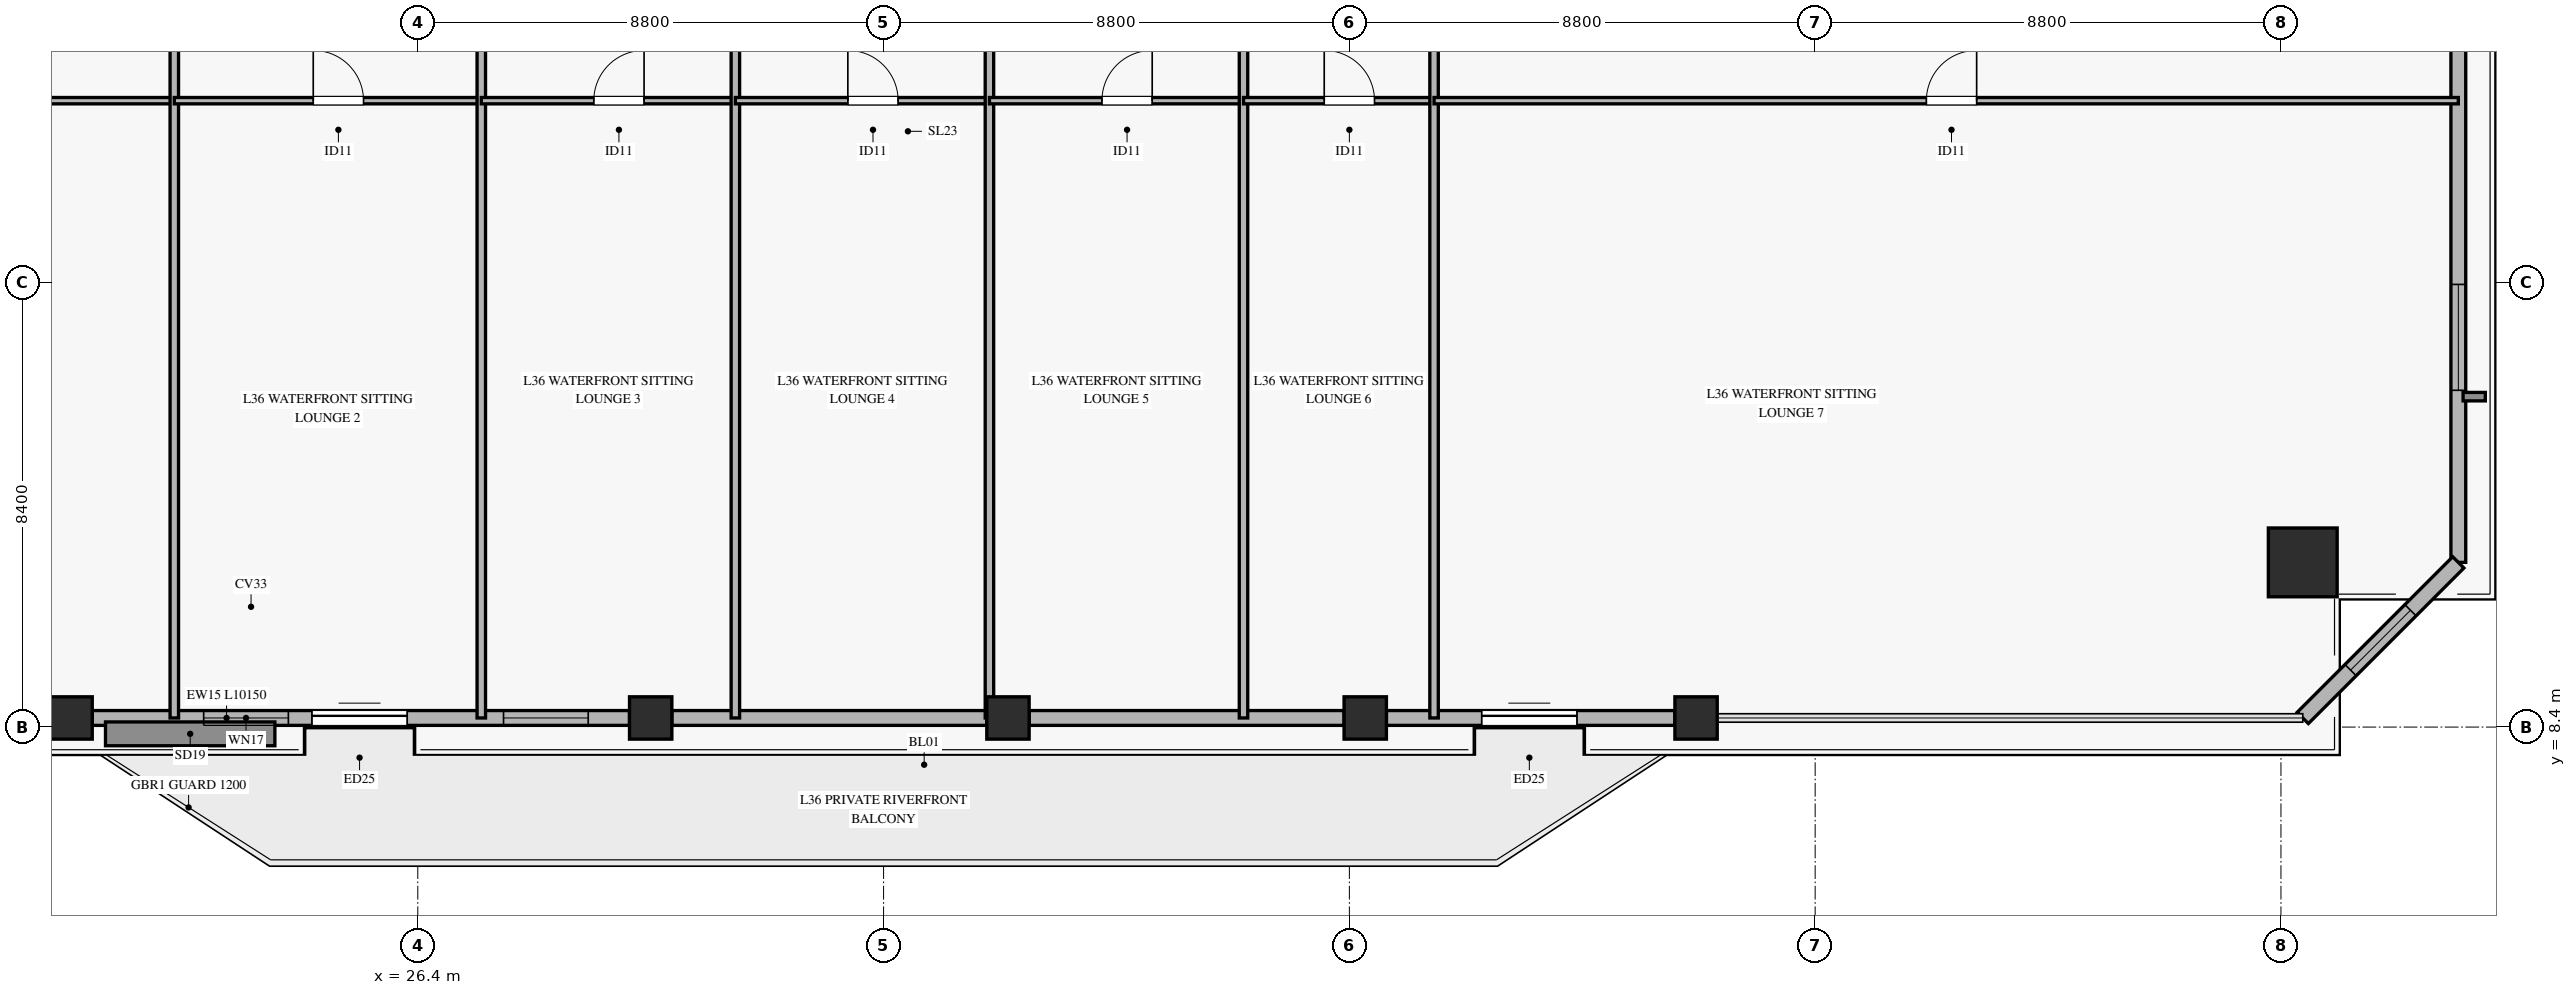
"""IFC4 building model, lengths in metres.
Left out: names, types, materials, properties, quantities, classifications, styles, units other than length and angle.
Written with IfcOpenShell. Run it as: python <this file> out.ifc"""

import sys

from ifc_helpers import new_model, si_unit, direction, frame, frame_2d, origin, origin_2d, place, context, subcontext, project, spatial, rectangle, hollow_rectangle, extrude, source, transform, mapped, element, fill, save


model = new_model("IFC4")
c1 = context("Model", 3, precision=1e-05, world=origin(), true_north=direction((0.0, 1.0)))
c2 = subcontext(c1, "Body", "Model", "MODEL_VIEW")
j1 = project(units=[si_unit("LENGTHUNIT", "METRE"), si_unit("PLANEANGLEUNIT", "RADIAN")], contexts=[c1])
p1 = place(None, origin())
s1 = spatial("IfcSite", under=j1, at=p1, CompositionType="ELEMENT")
p2 = place(p1, origin())
s2 = spatial("IfcBuilding", under=s1, at=p2, CompositionType="ELEMENT")
p3 = place(p2, frame((0.0, 0.0, 149.2)))
s3 = spatial("IfcBuildingStorey", under=s2, at=p3, CompositionType="ELEMENT", Elevation=149.2)
m1 = source(origin(), c2, "Body", "SweptSolid", [
    extrude(hollow_rectangle(XDim=1.3, YDim=1.3, WallThickness=0.06, at=origin_2d()), origin(), (0.0, 0.0, 1.0), 3.27),
])
p4 = place(p3, frame((62.012, 11.511, 0.0), z_axis=(0.0, 0.0, 1.0), x_axis=(1.0, 0.0, 0.0)))
e1 = element("IfcColumn", 1, at=p4, inside=s3, PredefinedType="COLUMN", context=c2, shape_type="MappedRepresentation", body=[
    mapped(m1, transform((0.0, 0.0, 0.0), x_axis=(1.0, 0.0, 0.0), y_axis=(0.0, 1.0, 0.0), z_axis=(0.0, 0.0, 1.0), scale=1.0)),
])
m2 = source(origin(), c2, "Body", "SweptSolid", [
    extrude(hollow_rectangle(XDim=0.8, YDim=0.8, WallThickness=0.036, at=origin_2d()), origin(), (0.0, 0.0, 1.0), 3.27),
])
for number, where, z_axis, x_axis in (
    (2, (19.85, 8.572, 0.0), (0.0, 0.0, 1.0), (1.0, 0.0, 0.0)),
    (3, (30.8, 8.572, 0.0), (0.0, 0.0, 1.0), (1.0, 0.0, 0.0)),
    (4, (37.55, 8.572, 0.0), (0.0, 0.0, 1.0), (1.0, 0.0, 0.0)),
    (5, (44.3, 8.572, 0.0), (0.0, 0.0, 1.0), (1.0, 0.0, 0.0)),
    (6, (50.55, 8.572, 0.0), (0.0, 0.0, 1.0), (1.0, 0.0, 0.0)),
):
    element("IfcColumn", number, at=place(p3, frame(where, z_axis=z_axis, x_axis=x_axis)), inside=s3, PredefinedType="COLUMN", context=c2, shape_type="MappedRepresentation", body=[
        mapped(m2, transform((0.0, 0.0, 0.0), x_axis=(1.0, 0.0, 0.0), y_axis=(0.0, 1.0, 0.0), z_axis=(0.0, 0.0, 1.0), scale=1.0)),
    ])
p5 = place(p3, frame((20.25, 8.572, 0.0), z_axis=(0.0, 0.0, 1.0), x_axis=(1.0, 0.0, 0.0)))
e7 = element("IfcWall", 7, at=p5, inside=s3, PredefinedType="SOLIDWALL", context=c2, shape_type="SweptSolid", body=[
    extrude(rectangle(XDim=10.15, YDim=0.28, at=frame_2d((5.075, 0.0))), origin(), (0.0, 0.0, 1.0), 2.75),
])
p6 = place(p5, frame((4.15, 0.0, 0.0)))
e8 = element("IfcOpeningElement", 8, at=p6, cuts=e7, PredefinedType="OPENING", context=c2, shape_type="SweptSolid", body=[
    extrude(rectangle(XDim=1.8, YDim=2.25, at=frame_2d((0.9, 1.125))), frame((0.0, 0.15, 0.0), z_axis=(0.0, -1.0, 0.0), x_axis=(1.0, 0.0, 0.0)), (0.0, 0.0, 1.0), 0.3),
])
p7 = place(p5, frame((2.105, 0.0, 0.45)))
e9 = element("IfcOpeningElement", 9, at=p7, cuts=e7, PredefinedType="OPENING", context=c2, shape_type="SweptSolid", body=[
    extrude(rectangle(XDim=1.6, YDim=2.0, at=frame_2d((0.8, 1.0))), frame((0.0, 0.15, 0.0), z_axis=(0.0, -1.0, 0.0), x_axis=(1.0, 0.0, 0.0)), (0.0, 0.0, 1.0), 0.3),
])
p8 = place(p5, frame((7.77, 0.0, 0.45)))
e10 = element("IfcOpeningElement", 10, at=p8, cuts=e7, PredefinedType="OPENING", context=c2, shape_type="SweptSolid", body=[
    extrude(rectangle(XDim=1.6, YDim=2.0, at=frame_2d((0.8, 1.0))), frame((0.0, 0.15, 0.0), z_axis=(0.0, -1.0, 0.0), x_axis=(1.0, 0.0, 0.0)), (0.0, 0.0, 1.0), 0.3),
])
for number, where, z_axis, x_axis in (
    (11, (31.2, 8.572, 0.0), (0.0, 0.0, 1.0), (1.0, 0.0, 0.0)),
    (12, (37.95, 8.572, 0.0), (0.0, 0.0, 1.0), (1.0, 0.0, 0.0)),
):
    element("IfcWall", number, at=place(p3, frame(where, z_axis=z_axis, x_axis=x_axis)), inside=s3, PredefinedType="SOLIDWALL", context=c2, shape_type="SweptSolid", body=[
        extrude(rectangle(XDim=5.95, YDim=0.28, at=frame_2d((2.975, 0.0))), origin(), (0.0, 0.0, 1.0), 2.75),
    ])
p9 = place(p3, frame((44.7, 8.572, 0.0), z_axis=(0.0, 0.0, 1.0), x_axis=(1.0, 0.0, 0.0)))
e13 = element("IfcWall", 13, at=p9, inside=s3, PredefinedType="SOLIDWALL", context=c2, shape_type="SweptSolid", body=[
    extrude(rectangle(XDim=5.45, YDim=0.28, at=frame_2d((2.725, 0.0))), origin(), (0.0, 0.0, 1.0), 2.75),
])
p10 = place(p9, frame((1.8, 0.0, 0.0)))
e14 = element("IfcOpeningElement", 14, at=p10, cuts=e13, PredefinedType="OPENING", context=c2, shape_type="SweptSolid", body=[
    extrude(rectangle(XDim=1.8, YDim=2.25, at=frame_2d((0.9, 1.125))), frame((0.0, 0.15, 0.0), z_axis=(0.0, -1.0, 0.0), x_axis=(1.0, 0.0, 0.0)), (0.0, 0.0, 1.0), 0.3),
])
p11 = place(p3, frame((64.951, 11.511, 0.0), z_axis=(0.0, 0.0, 1.0), x_axis=(0.0, 1.0, 0.0)))
e15 = element("IfcWall", 15, at=p11, inside=s3, PredefinedType="SOLIDWALL", context=c2, shape_type="SweptSolid", body=[
    extrude(rectangle(XDim=15.425, YDim=0.28, at=frame_2d((7.712, 0.0))), origin(), (0.0, 0.0, 1.0), 2.75),
])
p12 = place(p11, frame((3.251, 0.0, 0.45)))
e16 = element("IfcOpeningElement", 16, at=p12, cuts=e15, PredefinedType="OPENING", context=c2, shape_type="SweptSolid", body=[
    extrude(rectangle(XDim=2.0, YDim=2.0, at=frame_2d((1.0, 1.0))), frame((0.0, 0.15, 0.0), z_axis=(0.0, -1.0, 0.0), x_axis=(1.0, 0.0, 0.0)), (0.0, 0.0, 1.0), 0.3),
])
p13 = place(p11, frame((10.463, 0.0, 0.45)))
e17 = element("IfcOpeningElement", 17, at=p13, cuts=e15, PredefinedType="OPENING", context=c2, shape_type="SweptSolid", body=[
    extrude(rectangle(XDim=2.0, YDim=2.0, at=frame_2d((1.0, 1.0))), frame((0.0, 0.15, 0.0), z_axis=(0.0, -1.0, 0.0), x_axis=(1.0, 0.0, 0.0)), (0.0, 0.0, 1.0), 0.3),
])
p14 = place(p3, frame((62.012, 8.572, 0.0), z_axis=(0.0, 0.0, 1.0), x_axis=(0.707106781187, 0.707106781187, 0.0)))
e18 = element("IfcWall", 18, at=p14, inside=s3, PredefinedType="SOLIDWALL", context=c2, shape_type="SweptSolid", body=[
    extrude(rectangle(XDim=4.156, YDim=0.3, at=frame_2d((2.078, 0.0))), origin(), (0.0, 0.0, 1.0), 2.75),
])
p15 = place(p14, frame((1.278, 0.0, 0.45)))
e19 = element("IfcOpeningElement", 19, at=p15, cuts=e18, PredefinedType="OPENING", context=c2, shape_type="SweptSolid", body=[
    extrude(rectangle(XDim=1.6, YDim=2.0, at=frame_2d((0.8, 1.0))), frame((0.0, 0.16, 0.0), z_axis=(0.0, -1.0, 0.0), x_axis=(1.0, 0.0, 0.0)), (0.0, 0.0, 1.0), 0.32),
])
p16 = place(p3, frame((5.449, 20.233, 0.0), z_axis=(0.0, 0.0, 1.0), x_axis=(1.0, 0.0, 0.0)))
e20 = element("IfcWall", 20, at=p16, inside=s3, PredefinedType="PARTITIONING", context=c2, shape_type="SweptSolid", body=[
    extrude(rectangle(XDim=16.351, YDim=0.12, at=frame_2d((8.176, 0.0))), origin(), (0.0, 0.0, 1.0), 2.455),
])
p17 = place(p16, frame((8.001, 0.0, 0.0)))
e21 = element("IfcOpeningElement", 21, at=p17, cuts=e20, PredefinedType="OPENING", context=c2, shape_type="SweptSolid", body=[
    extrude(rectangle(XDim=0.95, YDim=2.1, at=frame_2d((0.475, 1.05))), frame((0.0, 0.07, 0.0), z_axis=(0.0, -1.0, 0.0), x_axis=(1.0, 0.0, 0.0)), (0.0, 0.0, 1.0), 0.14),
])
p18 = place(p3, frame((21.8, 8.572, 0.0), z_axis=(0.0, 0.0, 1.0), x_axis=(0.0, 1.0, 0.0)))
e22 = element("IfcWall", 22, at=p18, inside=s3, PredefinedType="PARTITIONING", context=c2, shape_type="SweptSolid", body=[
    extrude(rectangle(XDim=26.628, YDim=0.16, at=frame_2d((13.314, 0.0))), origin(), (0.0, 0.0, 1.0), 2.755),
])
p19 = place(p3, frame((21.8, 20.233, 0.0), z_axis=(0.0, 0.0, 1.0), x_axis=(1.0, 0.0, 0.0)))
e23 = element("IfcWall", 23, at=p19, inside=s3, PredefinedType="PARTITIONING", context=c2, shape_type="SweptSolid", body=[
    extrude(rectangle(XDim=5.8, YDim=0.12, at=frame_2d((2.9, 0.0))), origin(), (0.0, 0.0, 1.0), 3.27),
])
p20 = place(p19, frame((2.625, 0.0, 0.0)))
e24 = element("IfcOpeningElement", 24, at=p20, cuts=e23, PredefinedType="OPENING", context=c2, shape_type="SweptSolid", body=[
    extrude(rectangle(XDim=0.95, YDim=2.1, at=frame_2d((0.475, 1.05))), frame((0.0, 0.07, 0.0), z_axis=(0.0, -1.0, 0.0), x_axis=(1.0, 0.0, 0.0)), (0.0, 0.0, 1.0), 0.14),
])
p21 = place(p3, frame((27.6, 8.572, 0.0), z_axis=(0.0, 0.0, 1.0), x_axis=(0.0, 1.0, 0.0)))
e25 = element("IfcWall", 25, at=p21, inside=s3, PredefinedType="PARTITIONING", context=c2, shape_type="SweptSolid", body=[
    extrude(rectangle(XDim=26.628, YDim=0.16, at=frame_2d((13.314, 0.0))), origin(), (0.0, 0.0, 1.0), 2.755),
])
p22 = place(p3, frame((27.6, 20.233, 0.0), z_axis=(0.0, 0.0, 1.0), x_axis=(1.0, 0.0, 0.0)))
e26 = element("IfcWall", 26, at=p22, inside=s3, PredefinedType="PARTITIONING", context=c2, shape_type="SweptSolid", body=[
    extrude(rectangle(XDim=4.8, YDim=0.12, at=frame_2d((2.4, 0.0))), origin(), (0.0, 0.0, 1.0), 2.455),
])
p23 = place(p22, frame((2.125, 0.0, 0.0)))
e27 = element("IfcOpeningElement", 27, at=p23, cuts=e26, PredefinedType="OPENING", context=c2, shape_type="SweptSolid", body=[
    extrude(rectangle(XDim=0.95, YDim=2.1, at=frame_2d((0.475, 1.05))), frame((0.0, 0.07, 0.0), z_axis=(0.0, -1.0, 0.0), x_axis=(1.0, 0.0, 0.0)), (0.0, 0.0, 1.0), 0.14),
])
p24 = place(p3, frame((32.4, 8.572, 0.0), z_axis=(0.0, 0.0, 1.0), x_axis=(0.0, 1.0, 0.0)))
e28 = element("IfcWall", 28, at=p24, inside=s3, PredefinedType="PARTITIONING", context=c2, shape_type="SweptSolid", body=[
    extrude(rectangle(XDim=26.628, YDim=0.16, at=frame_2d((13.314, 0.0))), origin(), (0.0, 0.0, 1.0), 2.755),
])
p25 = place(p3, frame((32.4, 20.233, 0.0), z_axis=(0.0, 0.0, 1.0), x_axis=(1.0, 0.0, 0.0)))
e29 = element("IfcWall", 29, at=p25, inside=s3, PredefinedType="PARTITIONING", context=c2, shape_type="SweptSolid", body=[
    extrude(rectangle(XDim=4.8, YDim=0.12, at=frame_2d((2.4, 0.0))), origin(), (0.0, 0.0, 1.0), 3.27),
])
p26 = place(p25, frame((2.125, 0.0, 0.0)))
e30 = element("IfcOpeningElement", 30, at=p26, cuts=e29, PredefinedType="OPENING", context=c2, shape_type="SweptSolid", body=[
    extrude(rectangle(XDim=0.95, YDim=2.1, at=frame_2d((0.475, 1.05))), frame((0.0, 0.07, 0.0), z_axis=(0.0, -1.0, 0.0), x_axis=(1.0, 0.0, 0.0)), (0.0, 0.0, 1.0), 0.14),
])
p27 = place(p3, frame((37.2, 8.572, 0.0), z_axis=(0.0, 0.0, 1.0), x_axis=(0.0, 1.0, 0.0)))
e31 = element("IfcWall", 31, at=p27, inside=s3, PredefinedType="PARTITIONING", context=c2, shape_type="SweptSolid", body=[
    extrude(rectangle(XDim=26.628, YDim=0.16, at=frame_2d((13.314, 0.0))), origin(), (0.0, 0.0, 1.0), 2.805),
])
p28 = place(p3, frame((37.2, 20.233, 0.0), z_axis=(0.0, 0.0, 1.0), x_axis=(1.0, 0.0, 0.0)))
e32 = element("IfcWall", 32, at=p28, inside=s3, PredefinedType="PARTITIONING", context=c2, shape_type="SweptSolid", body=[
    extrude(rectangle(XDim=4.8, YDim=0.12, at=frame_2d((2.4, 0.0))), origin(), (0.0, 0.0, 1.0), 2.455),
])
p29 = place(p28, frame((2.125, 0.0, 0.0)))
e33 = element("IfcOpeningElement", 33, at=p29, cuts=e32, PredefinedType="OPENING", context=c2, shape_type="SweptSolid", body=[
    extrude(rectangle(XDim=0.95, YDim=2.1, at=frame_2d((0.475, 1.05))), frame((0.0, 0.07, 0.0), z_axis=(0.0, -1.0, 0.0), x_axis=(1.0, 0.0, 0.0)), (0.0, 0.0, 1.0), 0.14),
])
p30 = place(p3, frame((42.0, 8.572, 0.0), z_axis=(0.0, 0.0, 1.0), x_axis=(0.0, 1.0, 0.0)))
e34 = element("IfcWall", 34, at=p30, inside=s3, PredefinedType="PARTITIONING", context=c2, shape_type="SweptSolid", body=[
    extrude(rectangle(XDim=26.628, YDim=0.16, at=frame_2d((13.314, 0.0))), origin(), (0.0, 0.0, 1.0), 2.755),
])
p31 = place(p3, frame((42.0, 20.233, 0.0), z_axis=(0.0, 0.0, 1.0), x_axis=(1.0, 0.0, 0.0)))
e35 = element("IfcWall", 35, at=p31, inside=s3, PredefinedType="PARTITIONING", context=c2, shape_type="SweptSolid", body=[
    extrude(rectangle(XDim=3.6, YDim=0.12, at=frame_2d((1.8, 0.0))), origin(), (0.0, 0.0, 1.0), 2.455),
])
p32 = place(p31, frame((1.525, 0.0, 0.0)))
e36 = element("IfcOpeningElement", 36, at=p32, cuts=e35, PredefinedType="OPENING", context=c2, shape_type="SweptSolid", body=[
    extrude(rectangle(XDim=0.95, YDim=2.1, at=frame_2d((0.475, 1.05))), frame((0.0, 0.07, 0.0), z_axis=(0.0, -1.0, 0.0), x_axis=(1.0, 0.0, 0.0)), (0.0, 0.0, 1.0), 0.14),
])
p33 = place(p3, frame((45.6, 8.572, 0.0), z_axis=(0.0, 0.0, 1.0), x_axis=(0.0, 1.0, 0.0)))
e37 = element("IfcWall", 37, at=p33, inside=s3, PredefinedType="PARTITIONING", context=c2, shape_type="SweptSolid", body=[
    extrude(rectangle(XDim=26.628, YDim=0.16, at=frame_2d((13.314, 0.0))), origin(), (0.0, 0.0, 1.0), 2.755),
])
p34 = place(p3, frame((45.6, 20.233, 0.0), z_axis=(0.0, 0.0, 1.0), x_axis=(1.0, 0.0, 0.0)))
e38 = element("IfcWall", 38, at=p34, inside=s3, PredefinedType="PARTITIONING", context=c2, shape_type="SweptSolid", body=[
    extrude(rectangle(XDim=19.351, YDim=0.12, at=frame_2d((9.675, 0.0))), origin(), (0.0, 0.0, 1.0), 2.455),
])
p35 = place(p34, frame((9.301, 0.0, 0.0)))
e39 = element("IfcOpeningElement", 39, at=p35, cuts=e38, PredefinedType="OPENING", context=c2, shape_type="SweptSolid", body=[
    extrude(rectangle(XDim=0.95, YDim=2.1, at=frame_2d((0.475, 1.05))), frame((0.0, 0.07, 0.0), z_axis=(0.0, -1.0, 0.0), x_axis=(1.0, 0.0, 0.0)), (0.0, 0.0, 1.0), 0.14),
])
m3 = source(origin(), c2, "Body", "SweptSolid", [
    extrude(rectangle(XDim=1.8, YDim=2.25, at=frame_2d((0.9, 1.125))), frame((0.0, 0.025, 0.0), z_axis=(0.0, -1.0, 0.0), x_axis=(1.0, 0.0, 0.0)), (0.0, 0.0, 1.0), 0.05),
])
p36 = place(p6, origin())
e40 = element("IfcDoor", 40, at=p36, inside=s3, OperationType="SLIDING_TO_LEFT", PredefinedType="DOOR", context=c2, shape_type="MappedRepresentation", body=[
    mapped(m3, transform((0.0, 0.0, 0.0), x_axis=(1.0, 0.0, 0.0), y_axis=(0.0, 1.0, 0.0), z_axis=(0.0, 0.0, 1.0), scale=1.0)),
])
fill(e8, e40)
m4 = source(origin(), c2, "Body", "SweptSolid", [
    extrude(rectangle(XDim=1.6, YDim=2.0, at=frame_2d((0.8, 1.0))), frame((0.0, 0.03, 0.0), z_axis=(0.0, -1.0, 0.0), x_axis=(1.0, 0.0, 0.0)), (0.0, 0.0, 1.0), 0.06),
])
p37 = place(p7, origin())
e41 = element("IfcWindow", 41, at=p37, inside=s3, PartitioningType="SINGLE_PANEL", PredefinedType="WINDOW", context=c2, shape_type="MappedRepresentation", body=[
    mapped(m4, transform((0.0, 0.0, 0.0), x_axis=(1.0, 0.0, 0.0), y_axis=(0.0, 1.0, 0.0), z_axis=(0.0, 0.0, 1.0), scale=1.0)),
])
fill(e9, e41)
p38 = place(p8, origin())
e42 = element("IfcWindow", 42, at=p38, inside=s3, PartitioningType="SINGLE_PANEL", PredefinedType="WINDOW", context=c2, shape_type="MappedRepresentation", body=[
    mapped(m4, transform((0.0, 0.0, 0.0), x_axis=(1.0, 0.0, 0.0), y_axis=(0.0, 1.0, 0.0), z_axis=(0.0, 0.0, 1.0), scale=1.0)),
])
fill(e10, e42)
p39 = place(p10, origin())
e43 = element("IfcDoor", 43, at=p39, inside=s3, OperationType="SLIDING_TO_LEFT", PredefinedType="DOOR", context=c2, shape_type="MappedRepresentation", body=[
    mapped(m3, transform((0.0, 0.0, 0.0), x_axis=(1.0, 0.0, 0.0), y_axis=(0.0, 1.0, 0.0), z_axis=(0.0, 0.0, 1.0), scale=1.0)),
])
fill(e14, e43)
m5 = source(origin(), c2, "Body", "SweptSolid", [
    extrude(rectangle(XDim=2.0, YDim=2.0, at=frame_2d((1.0, 1.0))), frame((0.0, 0.03, 0.0), z_axis=(0.0, -1.0, 0.0), x_axis=(1.0, 0.0, 0.0)), (0.0, 0.0, 1.0), 0.06),
])
p40 = place(p12, origin())
e44 = element("IfcWindow", 44, at=p40, inside=s3, PartitioningType="SINGLE_PANEL", PredefinedType="WINDOW", context=c2, shape_type="MappedRepresentation", body=[
    mapped(m5, transform((0.0, 0.0, 0.0), x_axis=(1.0, 0.0, 0.0), y_axis=(0.0, 1.0, 0.0), z_axis=(0.0, 0.0, 1.0), scale=1.0)),
])
fill(e16, e44)
p41 = place(p15, origin())
e45 = element("IfcWindow", 45, at=p41, inside=s3, PartitioningType="SINGLE_PANEL", PredefinedType="WINDOW", context=c2, shape_type="MappedRepresentation", body=[
    mapped(m4, transform((0.0, 0.0, 0.0), x_axis=(1.0, 0.0, 0.0), y_axis=(0.0, 1.0, 0.0), z_axis=(0.0, 0.0, 1.0), scale=1.0)),
])
fill(e19, e45)
m6 = source(origin(), c2, "Body", "SweptSolid", [
    extrude(rectangle(XDim=0.95, YDim=2.1, at=frame_2d((0.475, 1.05))), frame((0.0, 0.025, 0.0), z_axis=(0.0, -1.0, 0.0), x_axis=(1.0, 0.0, 0.0)), (0.0, 0.0, 1.0), 0.05),
])
p42 = place(p20, origin())
e46 = element("IfcDoor", 46, at=p42, inside=s3, OperationType="SINGLE_SWING_LEFT", PredefinedType="DOOR", context=c2, shape_type="MappedRepresentation", body=[
    mapped(m6, transform((0.0, 0.0, 0.0), x_axis=(1.0, 0.0, 0.0), y_axis=(0.0, 1.0, 0.0), z_axis=(0.0, 0.0, 1.0), scale=1.0)),
])
fill(e24, e46)
p43 = place(p23, origin())
e47 = element("IfcDoor", 47, at=p43, inside=s3, OperationType="SINGLE_SWING_RIGHT", PredefinedType="DOOR", context=c2, shape_type="MappedRepresentation", body=[
    mapped(m6, transform((0.0, 0.0, 0.0), x_axis=(1.0, 0.0, 0.0), y_axis=(0.0, 1.0, 0.0), z_axis=(0.0, 0.0, 1.0), scale=1.0)),
])
fill(e27, e47)
p44 = place(p26, origin())
e48 = element("IfcDoor", 48, at=p44, inside=s3, OperationType="SINGLE_SWING_LEFT", PredefinedType="DOOR", context=c2, shape_type="MappedRepresentation", body=[
    mapped(m6, transform((0.0, 0.0, 0.0), x_axis=(1.0, 0.0, 0.0), y_axis=(0.0, 1.0, 0.0), z_axis=(0.0, 0.0, 1.0), scale=1.0)),
])
fill(e30, e48)
p45 = place(p29, origin())
e49 = element("IfcDoor", 49, at=p45, inside=s3, OperationType="SINGLE_SWING_RIGHT", PredefinedType="DOOR", context=c2, shape_type="MappedRepresentation", body=[
    mapped(m6, transform((0.0, 0.0, 0.0), x_axis=(1.0, 0.0, 0.0), y_axis=(0.0, 1.0, 0.0), z_axis=(0.0, 0.0, 1.0), scale=1.0)),
])
fill(e33, e49)
p46 = place(p32, origin())
e50 = element("IfcDoor", 50, at=p46, inside=s3, OperationType="SINGLE_SWING_LEFT", PredefinedType="DOOR", context=c2, shape_type="MappedRepresentation", body=[
    mapped(m6, transform((0.0, 0.0, 0.0), x_axis=(1.0, 0.0, 0.0), y_axis=(0.0, 1.0, 0.0), z_axis=(0.0, 0.0, 1.0), scale=1.0)),
])
fill(e36, e50)
p47 = place(p35, origin())
e51 = element("IfcDoor", 51, at=p47, inside=s3, OperationType="SINGLE_SWING_RIGHT", PredefinedType="DOOR", context=c2, shape_type="MappedRepresentation", body=[
    mapped(m6, transform((0.0, 0.0, 0.0), x_axis=(1.0, 0.0, 0.0), y_axis=(0.0, 1.0, 0.0), z_axis=(0.0, 0.0, 1.0), scale=1.0)),
])
fill(e39, e51)
save(model, sys.argv[1])
